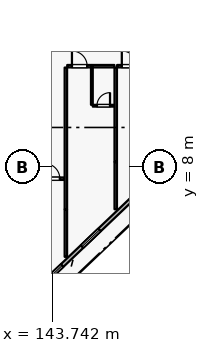
"""IFC4 building model, lengths in metres.
Left out: names, types, materials, properties, quantities, classifications, styles, units other than length and angle.
Written with IfcOpenShell. Run it as: python <this file> out.ifc"""

import sys

from ifc_helpers import new_model, si_unit, direction, frame, frame_2d, origin, place, context, subcontext, project, spatial, rectangle, extrude, element, fill, save


model = new_model("IFC4")
c1 = context("Model", 3, precision=1e-05, world=origin(), true_north=direction((0.0, 1.0)))
c2 = subcontext(c1, "Body", "Model", "MODEL_VIEW")
j1 = project(units=[si_unit("LENGTHUNIT", "METRE"), si_unit("PLANEANGLEUNIT", "RADIAN")], contexts=[c1])
p1 = place(None, origin())
s1 = spatial("IfcSite", under=j1, at=p1, CompositionType="ELEMENT")
p2 = place(p1, origin())
s2 = spatial("IfcBuilding", under=s1, at=p2, CompositionType="ELEMENT")
p3 = place(p2, frame((0.0, 0.0, 39.6)))
s3 = spatial("IfcBuildingStorey", under=s2, at=p3, CompositionType="ELEMENT", Elevation=39.6)
p4 = place(p3, frame((150.9, 7.714, 0.0), z_axis=(0.0, 0.0, 1.0), x_axis=(-0.724145477467, -0.689647248573, 0.0)))
e1 = element("IfcWall", 1, at=p4, inside=s3, PredefinedType="SOLIDWALL", context=c2, shape_type="SweptSolid", body=[
    extrude(rectangle(XDim=10.771, YDim=0.24, at=frame_2d((5.385, 0.0))), origin(), (0.0, 0.0, 1.0), 2.94),
])
p5 = place(p4, frame((1.238, 0.0, 0.0)))
e2 = element("IfcOpeningElement", 2, at=p5, cuts=e1, PredefinedType="OPENING", context=c2, shape_type="SweptSolid", body=[
    extrude(rectangle(XDim=1.5, YDim=2.25, at=frame_2d((0.75, 1.125))), frame((0.0, 0.13, 0.0), z_axis=(0.0, -1.0, 0.0), x_axis=(1.0, 0.0, 0.0)), (0.0, 0.0, 1.0), 0.26),
])
p6 = place(p4, frame((5.58, 0.0, 0.8)))
e3 = element("IfcOpeningElement", 3, at=p6, cuts=e1, PredefinedType="OPENING", context=c2, shape_type="SweptSolid", body=[
    extrude(rectangle(XDim=1.6, YDim=1.6, at=frame_2d((0.8, 0.8))), frame((0.0, 0.13, 0.0), z_axis=(0.0, -1.0, 0.0), x_axis=(1.0, 0.0, 0.0)), (0.0, 0.0, 1.0), 0.26),
])
p7 = place(p4, frame((8.977, 0.0, 0.8)))
e4 = element("IfcOpeningElement", 4, at=p7, cuts=e1, PredefinedType="OPENING", context=c2, shape_type="SweptSolid", body=[
    extrude(rectangle(XDim=1.6, YDim=1.6, at=frame_2d((0.8, 0.8))), frame((0.0, 0.13, 0.0), z_axis=(0.0, -1.0, 0.0), x_axis=(1.0, 0.0, 0.0)), (0.0, 0.0, 1.0), 0.26),
])
p8 = place(p3, frame((142.93, 7.23, 0.0), z_axis=(0.0, 0.0, 1.0), x_axis=(1.0, 0.0, 0.0)))
e5 = element("IfcWall", 5, at=p8, inside=s3, PredefinedType="PARTITIONING", context=c2, shape_type="SweptSolid", body=[
    extrude(rectangle(XDim=1.62, YDim=0.16, at=frame_2d((0.81, 0.0))), origin(), (0.0, 0.0, 1.0), 3.335),
])
p9 = place(p8, frame((0.31, 0.0, 0.0)))
e6 = element("IfcOpeningElement", 6, at=p9, cuts=e5, PredefinedType="OPENING", context=c2, shape_type="SweptSolid", body=[
    extrude(rectangle(XDim=1.0, YDim=2.25, at=frame_2d((0.5, 1.125))), frame((0.0, 0.09, 0.0), z_axis=(0.0, -1.0, 0.0), x_axis=(1.0, 0.0, 0.0)), (0.0, 0.0, 1.0), 0.18),
])
p10 = place(p3, frame((144.64, 2.09, 0.0), z_axis=(0.0, 0.0, 1.0), x_axis=(0.0, 1.0, 0.0)))
e7 = element("IfcWall", 7, at=p10, inside=s3, PredefinedType="PARTITIONING", context=c2, shape_type="SweptSolid", body=[
    extrude(rectangle(XDim=3.12, YDim=0.16, at=frame_2d((1.56, 0.0))), origin(), (0.0, 0.0, 1.0), 3.335),
])
p11 = place(p3, frame((144.73, 14.63, 0.0), z_axis=(0.0, 0.0, 1.0), x_axis=(1.0, 0.0, 0.0)))
e8 = element("IfcWall", 8, at=p11, inside=s3, PredefinedType="PARTITIONING", context=c2, shape_type="SweptSolid", body=[
    extrude(rectangle(XDim=1.62, YDim=0.16, at=frame_2d((0.81, 0.0))), origin(), (0.0, 0.0, 1.0), 3.335),
])
p12 = place(p11, frame((0.31, 0.0, 0.0)))
e9 = element("IfcOpeningElement", 9, at=p12, cuts=e8, PredefinedType="OPENING", context=c2, shape_type="SweptSolid", body=[
    extrude(rectangle(XDim=1.0, YDim=2.25, at=frame_2d((0.5, 1.125))), frame((0.0, 0.09, 0.0), z_axis=(0.0, -1.0, 0.0), x_axis=(1.0, 0.0, 0.0)), (0.0, 0.0, 1.0), 0.18),
])
p13 = place(p3, frame((146.36, 14.63, 0.0), z_axis=(0.0, 0.0, 1.0), x_axis=(1.0, 0.0, 0.0)))
e10 = element("IfcWall", 10, at=p13, inside=s3, PredefinedType="PARTITIONING", context=c2, shape_type="SweptSolid", body=[
    extrude(rectangle(XDim=1.47, YDim=0.16, at=frame_2d((0.735, 0.0))), origin(), (0.0, 0.0, 1.0), 3.335),
])
p14 = place(p3, frame((146.35, 12.09, 0.0), z_axis=(0.0, 0.0, 1.0), x_axis=(0.0, 1.0, 0.0)))
e11 = element("IfcWall", 11, at=p14, inside=s3, PredefinedType="PARTITIONING", context=c2, shape_type="SweptSolid", body=[
    extrude(rectangle(XDim=2.45, YDim=0.115, at=frame_2d((1.225, 0.0))), origin(), (0.0, 0.0, 1.0), 3.335),
])
p15 = place(p3, frame((146.41, 12.03, 0.0), z_axis=(0.0, 0.0, 1.0), x_axis=(1.0, 0.0, 0.0)))
e12 = element("IfcWall", 12, at=p15, inside=s3, PredefinedType="PARTITIONING", context=c2, shape_type="SweptSolid", body=[
    extrude(rectangle(XDim=1.41, YDim=0.115, at=frame_2d((0.705, 0.0))), origin(), (0.0, 0.0, 1.0), 3.335),
])
p16 = place(p15, frame((0.275, 0.0, 0.0)))
e13 = element("IfcOpeningElement", 13, at=p16, cuts=e12, PredefinedType="OPENING", context=c2, shape_type="SweptSolid", body=[
    extrude(rectangle(XDim=0.86, YDim=2.12, at=frame_2d((0.43, 1.06))), frame((0.0, 0.067, 0.0), z_axis=(0.0, -1.0, 0.0), x_axis=(1.0, 0.0, 0.0)), (0.0, 0.0, 1.0), 0.135),
])
p17 = place(p3, frame((144.64, 5.22, 0.0), z_axis=(0.0, 0.0, 1.0), x_axis=(0.0, 1.0, 0.0)))
e14 = element("IfcWall", 14, at=p17, inside=s3, PredefinedType="PARTITIONING", context=c2, shape_type="SweptSolid", body=[
    extrude(rectangle(XDim=9.32, YDim=0.16, at=frame_2d((4.66, 0.0))), origin(), (0.0, 0.0, 1.0), 3.335),
])
p18 = place(p3, frame((147.92, 5.22, 0.0), z_axis=(0.0, 0.0, 1.0), x_axis=(0.0, 1.0, 0.0)))
e15 = element("IfcWall", 15, at=p18, inside=s3, PredefinedType="PARTITIONING", context=c2, shape_type="SweptSolid", body=[
    extrude(rectangle(XDim=3.11, YDim=0.16, at=frame_2d((1.555, 0.0))), origin(), (0.0, 0.0, 1.0), 3.335),
])
p19 = place(p3, frame((148.01, 14.63, 0.0), z_axis=(0.0, 0.0, 1.0), x_axis=(1.0, 0.0, 0.0)))
e16 = element("IfcWall", 16, at=p19, inside=s3, PredefinedType="PARTITIONING", context=c2, shape_type="SweptSolid", body=[
    extrude(rectangle(XDim=1.62, YDim=0.16, at=frame_2d((0.81, 0.0))), origin(), (0.0, 0.0, 1.0), 3.335),
])
p20 = place(p19, frame((0.31, 0.0, 0.0)))
e17 = element("IfcOpeningElement", 17, at=p20, cuts=e16, PredefinedType="OPENING", context=c2, shape_type="SweptSolid", body=[
    extrude(rectangle(XDim=1.0, YDim=2.25, at=frame_2d((0.5, 1.125))), frame((0.0, 0.09, 0.0), z_axis=(0.0, -1.0, 0.0), x_axis=(1.0, 0.0, 0.0)), (0.0, 0.0, 1.0), 0.18),
])
p21 = place(p3, frame((147.92, 8.34, 0.0), z_axis=(0.0, 0.0, 1.0), x_axis=(0.0, 1.0, 0.0)))
e18 = element("IfcWall", 18, at=p21, inside=s3, PredefinedType="PARTITIONING", context=c2, shape_type="SweptSolid", body=[
    extrude(rectangle(XDim=6.2, YDim=0.16, at=frame_2d((3.1, 0.0))), origin(), (0.0, 0.0, 1.0), 3.335),
])
p22 = place(p6, origin())
e19 = element("IfcWindow", 19, at=p22, inside=s3, PartitioningType="SINGLE_PANEL", PredefinedType="WINDOW", context=c2, shape_type="SweptSolid", body=[
    extrude(rectangle(XDim=1.6, YDim=1.6, at=frame_2d((0.8, 0.8))), frame((0.0, 0.03, 0.0), z_axis=(0.0, -1.0, 0.0), x_axis=(1.0, 0.0, 0.0)), (0.0, 0.0, 1.0), 0.06),
])
fill(e3, e19)
p23 = place(p7, origin())
e20 = element("IfcWindow", 20, at=p23, inside=s3, PartitioningType="SINGLE_PANEL", PredefinedType="WINDOW", context=c2, shape_type="SweptSolid", body=[
    extrude(rectangle(XDim=1.6, YDim=1.6, at=frame_2d((0.8, 0.8))), frame((0.0, 0.03, 0.0), z_axis=(0.0, -1.0, 0.0), x_axis=(1.0, 0.0, 0.0)), (0.0, 0.0, 1.0), 0.06),
])
fill(e4, e20)
p24 = place(p9, origin())
e21 = element("IfcDoor", 21, at=p24, inside=s3, OperationType="SINGLE_SWING_LEFT", PredefinedType="DOOR", context=c2, shape_type="SweptSolid", body=[
    extrude(rectangle(XDim=1.0, YDim=2.25, at=frame_2d((0.5, 1.125))), frame((0.0, 0.025, 0.0), z_axis=(0.0, -1.0, 0.0), x_axis=(1.0, 0.0, 0.0)), (0.0, 0.0, 1.0), 0.05),
])
fill(e6, e21)
p25 = place(p12, origin())
e22 = element("IfcDoor", 22, at=p25, inside=s3, OperationType="SINGLE_SWING_LEFT", PredefinedType="DOOR", context=c2, shape_type="SweptSolid", body=[
    extrude(rectangle(XDim=1.0, YDim=2.25, at=frame_2d((0.5, 1.125))), frame((0.0, 0.025, 0.0), z_axis=(0.0, -1.0, 0.0), x_axis=(1.0, 0.0, 0.0)), (0.0, 0.0, 1.0), 0.05),
])
fill(e9, e22)
p26 = place(p16, origin())
e23 = element("IfcDoor", 23, at=p26, inside=s3, OperationType="SINGLE_SWING_RIGHT", PredefinedType="DOOR", context=c2, shape_type="SweptSolid", body=[
    extrude(rectangle(XDim=0.86, YDim=2.12, at=frame_2d((0.43, 1.06))), frame((0.0, 0.025, 0.0), z_axis=(0.0, -1.0, 0.0), x_axis=(1.0, 0.0, 0.0)), (0.0, 0.0, 1.0), 0.05),
])
fill(e13, e23)
p27 = place(p20, origin())
e24 = element("IfcDoor", 24, at=p27, inside=s3, OperationType="SINGLE_SWING_LEFT", PredefinedType="DOOR", context=c2, shape_type="SweptSolid", body=[
    extrude(rectangle(XDim=1.0, YDim=2.25, at=frame_2d((0.5, 1.125))), frame((0.0, 0.025, 0.0), z_axis=(0.0, -1.0, 0.0), x_axis=(1.0, 0.0, 0.0)), (0.0, 0.0, 1.0), 0.05),
])
fill(e17, e24)
save(model, sys.argv[1])
